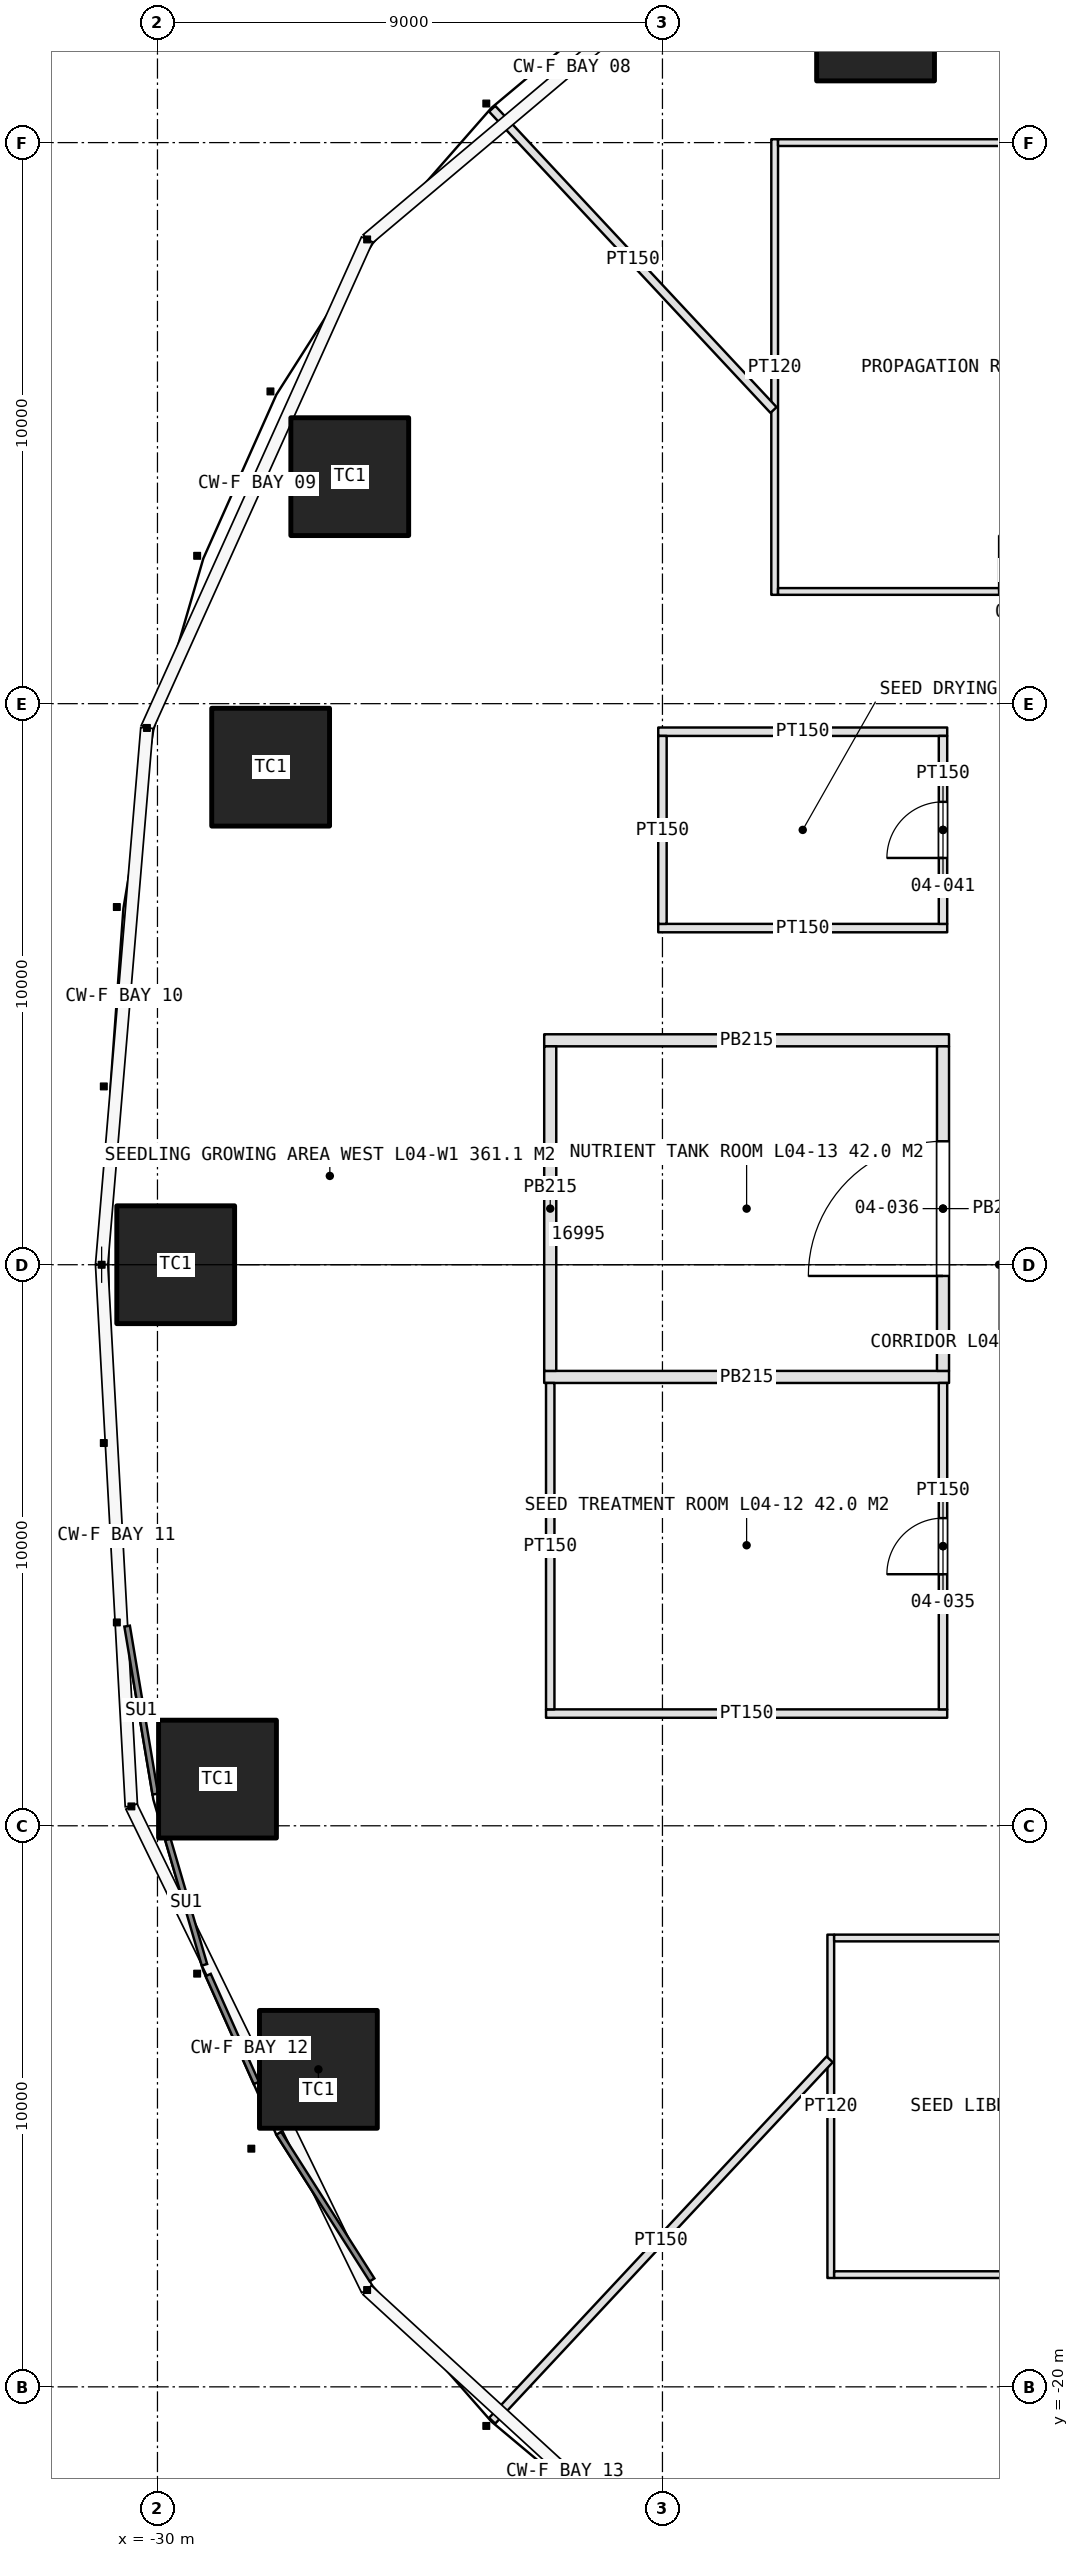
"""IFC4 building model, lengths in metres.
Left out: names, types, materials, properties, quantities, classifications, styles, units other than length and angle.
Written with IfcOpenShell. Run it as: python <this file> out.ifc"""

import sys

from ifc_helpers import new_model, si_unit, direction, frame, frame_2d, origin, origin_2d, place, context, subcontext, project, spatial, rectangle, extrude, element, fill, save


model = new_model("IFC4")
c1 = context("Model", 3, precision=1e-05, world=origin(), true_north=direction((0.0, 1.0)))
c2 = subcontext(c1, "Body", "Model", "MODEL_VIEW")
j1 = project(units=[si_unit("LENGTHUNIT", "METRE"), si_unit("PLANEANGLEUNIT", "RADIAN")], contexts=[c1])
p1 = place(None, origin())
s1 = spatial("IfcSite", under=j1, at=p1, CompositionType="ELEMENT")
p2 = place(p1, origin())
s2 = spatial("IfcBuilding", under=s1, at=p2, CompositionType="ELEMENT")
p3 = place(p2, frame((0.0, 0.0, 20.0)))
s3 = spatial("IfcBuildingStorey", under=s2, at=p3, CompositionType="ELEMENT", Elevation=20.0)
for number, where, z_axis, x_axis in (
    (1, (-17.202, 22.15, 0.0), (0.0, 0.0, 1.0), (1.0, 0.0, 0.0)),
    (2, (-26.573, 14.046, 0.0), (0.0, 0.0, 1.0), (1.0, 0.0, 0.0)),
    (3, (-27.983, 8.868, 0.0), (0.0, 0.0, 1.0), (1.0, 0.0, 0.0)),
    (4, (-29.675, 0.0, 0.0), (0.0, 0.0, 1.0), (1.0, 0.0, 0.0)),
    (5, (-28.93, -9.168, 0.0), (0.0, 0.0, 1.0), (1.0, 0.0, 0.0)),
    (6, (-27.132, -14.341, 0.0), (0.0, 0.0, 1.0), (1.0, 0.0, 0.0)),
):
    element("IfcColumn", number, at=place(p3, frame(where, z_axis=z_axis, x_axis=x_axis)), inside=s3, PredefinedType="COLUMN", context=c2, shape_type="SweptSolid", body=[
        extrude(rectangle(XDim=2.1, YDim=2.1, at=origin_2d()), origin(), (0.0, 0.0, 1.0), 5.0),
    ])
p4 = place(p3, frame((-19.0, 11.94, 0.0), z_axis=(0.0, 0.0, 1.0), x_axis=(0.0, 1.0, 0.0)))
e7 = element("IfcWall", 7, at=p4, inside=s3, PredefinedType="PARTITIONING", context=c2, shape_type="SweptSolid", body=[
    extrude(rectangle(XDim=8.12, YDim=0.12, at=frame_2d((4.06, 0.0))), origin(), (0.0, 0.0, 1.0), 3.6),
])
p5 = place(p3, frame((-18.94, 12.0, 0.0), z_axis=(0.0, 0.0, 1.0), x_axis=(1.0, 0.0, 0.0)))
e8 = element("IfcWall", 8, at=p5, inside=s3, PredefinedType="PARTITIONING", context=c2, shape_type="SweptSolid", body=[
    extrude(rectangle(XDim=8.88, YDim=0.12, at=frame_2d((4.44, 0.0))), origin(), (0.0, 0.0, 1.0), 3.6),
])
p6 = place(p5, frame((3.94, 0.0, 0.0)))
e9 = element("IfcOpeningElement", 9, at=p6, cuts=e8, PredefinedType="OPENING", context=c2, shape_type="SweptSolid", body=[
    extrude(rectangle(XDim=1.0, YDim=2.2, at=frame_2d((0.5, 1.1))), frame((0.0, 0.07, 0.0), z_axis=(0.0, -1.0, 0.0), x_axis=(1.0, 0.0, 0.0)), (0.0, 0.0, 1.0), 0.14),
])
p7 = place(p3, frame((-18.94, 20.0, 0.0), z_axis=(0.0, 0.0, 1.0), x_axis=(1.0, 0.0, 0.0)))
e10 = element("IfcWall", 10, at=p7, inside=s3, PredefinedType="PARTITIONING", context=c2, shape_type="SweptSolid", body=[
    extrude(rectangle(XDim=8.88, YDim=0.12, at=frame_2d((4.44, 0.0))), origin(), (0.0, 0.0, 1.0), 3.6),
])
p8 = place(p3, frame((-18.0, -11.94, 0.0), z_axis=(0.0, 0.0, 1.0), x_axis=(0.0, -1.0, 0.0)))
e11 = element("IfcWall", 11, at=p8, inside=s3, PredefinedType="PARTITIONING", context=c2, shape_type="SweptSolid", body=[
    extrude(rectangle(XDim=6.12, YDim=0.12, at=frame_2d((3.06, 0.0))), origin(), (0.0, 0.0, 1.0), 3.6),
])
p9 = place(p3, frame((-17.94, -12.0, 0.0), z_axis=(0.0, 0.0, 1.0), x_axis=(1.0, 0.0, 0.0)))
e12 = element("IfcWall", 12, at=p9, inside=s3, PredefinedType="PARTITIONING", context=c2, shape_type="SweptSolid", body=[
    extrude(rectangle(XDim=7.88, YDim=0.12, at=frame_2d((3.94, 0.0))), origin(), (0.0, 0.0, 1.0), 3.6),
])
p10 = place(p9, frame((3.44, 0.0, 0.0)))
e13 = element("IfcOpeningElement", 13, at=p10, cuts=e12, PredefinedType="OPENING", context=c2, shape_type="SweptSolid", body=[
    extrude(rectangle(XDim=1.0, YDim=2.2, at=frame_2d((0.5, 1.1))), frame((0.0, 0.07, 0.0), z_axis=(0.0, -1.0, 0.0), x_axis=(1.0, 0.0, 0.0)), (0.0, 0.0, 1.0), 0.14),
])
p11 = place(p3, frame((-17.94, -18.0, 0.0), z_axis=(0.0, 0.0, 1.0), x_axis=(1.0, 0.0, 0.0)))
e14 = element("IfcWall", 14, at=p11, inside=s3, PredefinedType="PARTITIONING", context=c2, shape_type="SweptSolid", body=[
    extrude(rectangle(XDim=7.88, YDim=0.12, at=frame_2d((3.94, 0.0))), origin(), (0.0, 0.0, 1.0), 3.6),
])
p12 = place(p3, frame((-15.925, -8.0, 0.0), z_axis=(0.0, 0.0, 1.0), x_axis=(-1.0, 0.0, 0.0)))
e15 = element("IfcWall", 15, at=p12, inside=s3, PredefinedType="PARTITIONING", context=c2, shape_type="SweptSolid", body=[
    extrude(rectangle(XDim=7.15, YDim=0.15, at=frame_2d((3.575, 0.0))), origin(), (0.0, 0.0, 1.0), 3.6),
])
for number, where, z_axis, x_axis in (
    (16, (-15.893, -2.0, 0.0), (0.0, 0.0, 1.0), (-1.0, 0.0, 0.0)),
    (17, (-15.893, 4.0, 0.0), (0.0, 0.0, 1.0), (-1.0, 0.0, 0.0)),
):
    element("IfcWall", number, at=place(p3, frame(where, z_axis=z_axis, x_axis=x_axis)), inside=s3, PredefinedType="PARTITIONING", context=c2, shape_type="SweptSolid", body=[
        extrude(rectangle(XDim=7.215, YDim=0.215, at=frame_2d((3.607, 0.0))), origin(), (0.0, 0.0, 1.0), 3.6),
    ])
p13 = place(p3, frame((-16.0, -7.925, 0.0), z_axis=(0.0, 0.0, 1.0), x_axis=(0.0, 1.0, 0.0)))
e18 = element("IfcWall", 18, at=p13, inside=s3, PredefinedType="PARTITIONING", context=c2, shape_type="SweptSolid", body=[
    extrude(rectangle(XDim=5.818, YDim=0.15, at=frame_2d((2.909, 0.0))), origin(), (0.0, 0.0, 1.0), 3.6),
])
p14 = place(p13, frame((2.409, 0.0, 0.0)))
e19 = element("IfcOpeningElement", 19, at=p14, cuts=e18, PredefinedType="OPENING", context=c2, shape_type="SweptSolid", body=[
    extrude(rectangle(XDim=1.0, YDim=2.2, at=frame_2d((0.5, 1.1))), frame((0.0, 0.085, 0.0), z_axis=(0.0, -1.0, 0.0), x_axis=(1.0, 0.0, 0.0)), (0.0, 0.0, 1.0), 0.17),
])
p15 = place(p3, frame((-23.0, -7.925, 0.0), z_axis=(0.0, 0.0, 1.0), x_axis=(0.0, 1.0, 0.0)))
e20 = element("IfcWall", 20, at=p15, inside=s3, PredefinedType="PARTITIONING", context=c2, shape_type="SweptSolid", body=[
    extrude(rectangle(XDim=5.818, YDim=0.15, at=frame_2d((2.909, 0.0))), origin(), (0.0, 0.0, 1.0), 3.6),
])
p16 = place(p3, frame((-16.0, -1.893, 0.0), z_axis=(0.0, 0.0, 1.0), x_axis=(0.0, 1.0, 0.0)))
e21 = element("IfcWall", 21, at=p16, inside=s3, PredefinedType="PARTITIONING", context=c2, shape_type="SweptSolid", body=[
    extrude(rectangle(XDim=5.785, YDim=0.215, at=frame_2d((2.893, 0.0))), origin(), (0.0, 0.0, 1.0), 3.6),
])
p17 = place(p16, frame((1.692, 0.0, 0.0)))
e22 = element("IfcOpeningElement", 22, at=p17, cuts=e21, PredefinedType="OPENING", context=c2, shape_type="SweptSolid", body=[
    extrude(rectangle(XDim=2.4, YDim=2.4, at=frame_2d((1.2, 1.2))), frame((0.0, 0.118, 0.0), z_axis=(0.0, -1.0, 0.0), x_axis=(1.0, 0.0, 0.0)), (0.0, 0.0, 1.0), 0.235),
])
p18 = place(p3, frame((-23.0, -1.893, 0.0), z_axis=(0.0, 0.0, 1.0), x_axis=(0.0, 1.0, 0.0)))
e23 = element("IfcWall", 23, at=p18, inside=s3, PredefinedType="PARTITIONING", context=c2, shape_type="SweptSolid", body=[
    extrude(rectangle(XDim=5.785, YDim=0.215, at=frame_2d((2.893, 0.0))), origin(), (0.0, 0.0, 1.0), 3.6),
])
for number, where, z_axis, x_axis in (
    (24, (-15.925, 6.0, 0.0), (0.0, 0.0, 1.0), (-1.0, 0.0, 0.0)),
    (25, (-15.925, 9.5, 0.0), (0.0, 0.0, 1.0), (-1.0, 0.0, 0.0)),
):
    element("IfcWall", number, at=place(p3, frame(where, z_axis=z_axis, x_axis=x_axis)), inside=s3, PredefinedType="PARTITIONING", context=c2, shape_type="SweptSolid", body=[
        extrude(rectangle(XDim=5.15, YDim=0.15, at=frame_2d((2.575, 0.0))), origin(), (0.0, 0.0, 1.0), 3.6),
    ])
p19 = place(p3, frame((-16.0, 6.075, 0.0), z_axis=(0.0, 0.0, 1.0), x_axis=(0.0, 1.0, 0.0)))
e26 = element("IfcWall", 26, at=p19, inside=s3, PredefinedType="PARTITIONING", context=c2, shape_type="SweptSolid", body=[
    extrude(rectangle(XDim=3.35, YDim=0.15, at=frame_2d((1.675, 0.0))), origin(), (0.0, 0.0, 1.0), 3.6),
])
p20 = place(p19, frame((1.175, 0.0, 0.0)))
e27 = element("IfcOpeningElement", 27, at=p20, cuts=e26, PredefinedType="OPENING", context=c2, shape_type="SweptSolid", body=[
    extrude(rectangle(XDim=1.0, YDim=2.2, at=frame_2d((0.5, 1.1))), frame((0.0, 0.085, 0.0), z_axis=(0.0, -1.0, 0.0), x_axis=(1.0, 0.0, 0.0)), (0.0, 0.0, 1.0), 0.17),
])
p21 = place(p3, frame((-21.0, 6.075, 0.0), z_axis=(0.0, 0.0, 1.0), x_axis=(0.0, 1.0, 0.0)))
e28 = element("IfcWall", 28, at=p21, inside=s3, PredefinedType="PARTITIONING", context=c2, shape_type="SweptSolid", body=[
    extrude(rectangle(XDim=3.35, YDim=0.15, at=frame_2d((1.675, 0.0))), origin(), (0.0, 0.0, 1.0), 3.6),
])
p22 = place(p3, frame((-18.02, -14.163, 0.0), z_axis=(0.0, 0.0, 1.0), x_axis=(-0.682521563847, -0.730865456075, 0.0)))
e29 = element("IfcWall", 29, at=p22, inside=s3, PredefinedType="PARTITIONING", context=c2, shape_type="SweptSolid", body=[
    extrude(rectangle(XDim=8.812, YDim=0.15, at=frame_2d((4.406, 0.0))), origin(), (0.0, 0.0, 1.0), 3.6),
])
p23 = place(p3, frame((-19.02, 15.234, 0.0), z_axis=(0.0, 0.0, 1.0), x_axis=(-0.682519491562, 0.730867391281, 0.0)))
e30 = element("IfcWall", 30, at=p23, inside=s3, PredefinedType="PARTITIONING", context=c2, shape_type="SweptSolid", body=[
    extrude(rectangle(XDim=7.347, YDim=0.15, at=frame_2d((3.674, 0.0))), origin(), (0.0, 0.0, 1.0), 3.6),
])
p24 = place(p14, origin())
e31 = element("IfcDoor", 31, at=p24, inside=s3, OperationType="SINGLE_SWING_LEFT", PredefinedType="DOOR", context=c2, shape_type="SweptSolid", body=[
    extrude(rectangle(XDim=1.0, YDim=2.2, at=frame_2d((0.5, 1.1))), frame((0.0, 0.025, 0.0), z_axis=(0.0, -1.0, 0.0), x_axis=(1.0, 0.0, 0.0)), (0.0, 0.0, 1.0), 0.05),
])
fill(e19, e31)
p25 = place(p17, origin())
e32 = element("IfcDoor", 32, at=p25, inside=s3, OperationType="DOUBLE_DOOR_SINGLE_SWING", PredefinedType="DOOR", context=c2, shape_type="SweptSolid", body=[
    extrude(rectangle(XDim=2.4, YDim=2.4, at=frame_2d((1.2, 1.2))), frame((0.0, 0.025, 0.0), z_axis=(0.0, -1.0, 0.0), x_axis=(1.0, 0.0, 0.0)), (0.0, 0.0, 1.0), 0.05),
])
fill(e22, e32)
p26 = place(p20, origin())
e33 = element("IfcDoor", 33, at=p26, inside=s3, OperationType="SINGLE_SWING_LEFT", PredefinedType="DOOR", context=c2, shape_type="SweptSolid", body=[
    extrude(rectangle(XDim=1.0, YDim=2.2, at=frame_2d((0.5, 1.1))), frame((0.0, 0.025, 0.0), z_axis=(0.0, -1.0, 0.0), x_axis=(1.0, 0.0, 0.0)), (0.0, 0.0, 1.0), 0.05),
])
fill(e27, e33)
save(model, sys.argv[1])
